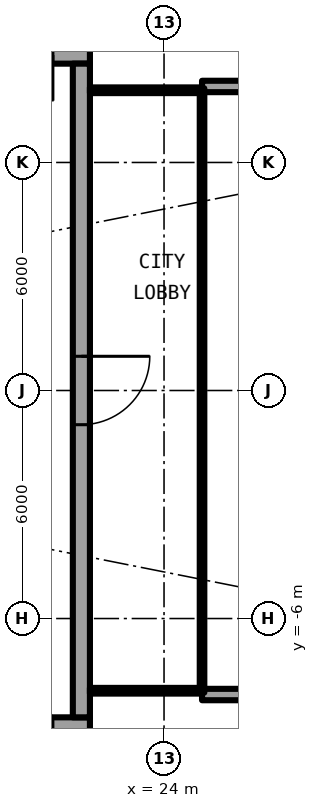
"""IFC4 building model, lengths in metres.
Left out: names, types, materials, properties, quantities, classifications, styles, units other than length and angle.
Written with IfcOpenShell. Run it as: python <this file> out.ifc"""

import sys

from ifc_helpers import new_model, si_unit, direction, frame, frame_2d, origin, place, context, subcontext, project, spatial, rectangle, extrude, element, fill, save


model = new_model("IFC4")
c1 = context("Model", 3, precision=1e-05, world=origin(), true_north=direction((0.0, 1.0)))
c2 = subcontext(c1, "Body", "Model", "MODEL_VIEW")
j1 = project(units=[si_unit("LENGTHUNIT", "METRE"), si_unit("PLANEANGLEUNIT", "RADIAN")], contexts=[c1])
p1 = place(None, origin())
s1 = spatial("IfcSite", under=j1, at=p1, CompositionType="ELEMENT")
p2 = place(p1, origin())
s2 = spatial("IfcBuilding", under=s1, at=p2, CompositionType="ELEMENT")
p3 = place(p2, frame((0.0, 0.0, 196.3)))
s3 = spatial("IfcBuildingStorey", under=s2, at=p3, CompositionType="ELEMENT", Elevation=196.3)
for number, where, z_axis, x_axis in (
    (1, (25.0, 8.0, 0.0), (0.0, 0.0, 1.0), (1.0, 0.0, 0.0)),
    (2, (25.0, -8.0, 0.0), (0.0, 0.0, 1.0), (1.0, 0.0, 0.0)),
):
    element("IfcWall", number, at=place(p3, frame(where, z_axis=z_axis, x_axis=x_axis)), inside=s3, PredefinedType="SOLIDWALL", context=c2, shape_type="SweptSolid", body=[
        extrude(rectangle(XDim=2.667, YDim=0.3, at=frame_2d((1.333, 0.0))), origin(), (0.0, 0.0, 1.0), 2.7),
    ])
p4 = place(p3, frame((22.05, 8.825, 0.0), z_axis=(0.0, 0.0, 1.0), x_axis=(-1.0, 0.0, 0.0)))
e3 = element("IfcWall", 3, at=p4, inside=s3, PredefinedType="SHEAR", context=c2, shape_type="SweptSolid", body=[
    extrude(rectangle(XDim=13.5, YDim=0.45, at=frame_2d((6.75, 0.0))), origin(), (0.0, 0.0, 1.0), 3.05),
])
p5 = place(p4, frame((0.975, 0.0, 0.0)))
e4 = element("IfcOpeningElement", 4, at=p5, cuts=e3, PredefinedType="OPENING", context=c2, shape_type="SweptSolid", body=[
    extrude(rectangle(XDim=1.2, YDim=2.3, at=frame_2d((0.6, 1.15))), frame((0.0, 0.235, 0.0), z_axis=(0.0, -1.0, 0.0), x_axis=(1.0, 0.0, 0.0)), (0.0, 0.0, 1.0), 0.47),
])
p6 = place(p3, frame((8.55, -8.825, 0.0), z_axis=(0.0, 0.0, 1.0), x_axis=(1.0, 0.0, 0.0)))
e5 = element("IfcWall", 5, at=p6, inside=s3, PredefinedType="SHEAR", context=c2, shape_type="SweptSolid", body=[
    extrude(rectangle(XDim=13.5, YDim=0.45, at=frame_2d((6.75, 0.0))), origin(), (0.0, 0.0, 1.0), 3.05),
])
p7 = place(p6, frame((11.325, 0.0, 0.0)))
e6 = element("IfcOpeningElement", 6, at=p7, cuts=e5, PredefinedType="OPENING", context=c2, shape_type="SweptSolid", body=[
    extrude(rectangle(XDim=1.2, YDim=2.3, at=frame_2d((0.6, 1.15))), frame((0.0, 0.235, 0.0), z_axis=(0.0, -1.0, 0.0), x_axis=(1.0, 0.0, 0.0)), (0.0, 0.0, 1.0), 0.47),
])
p8 = place(p3, frame((21.825, 8.6, 0.0), z_axis=(0.0, 0.0, 1.0), x_axis=(0.0, -1.0, 0.0)))
e7 = element("IfcWall", 7, at=p8, inside=s3, PredefinedType="SHEAR", context=c2, shape_type="SweptSolid", body=[
    extrude(rectangle(XDim=17.2, YDim=0.45, at=frame_2d((8.6, 0.0))), origin(), (0.0, 0.0, 1.0), 3.05),
])
p9 = place(p8, frame((7.7, 0.0, 0.0)))
e8 = element("IfcOpeningElement", 8, at=p9, cuts=e7, PredefinedType="OPENING", context=c2, shape_type="SweptSolid", body=[
    extrude(rectangle(XDim=1.8, YDim=2.3, at=frame_2d((0.9, 1.15))), frame((0.0, 0.235, 0.0), z_axis=(0.0, -1.0, 0.0), x_axis=(1.0, 0.0, 0.0)), (0.0, 0.0, 1.0), 0.47),
])
for number, where, z_axis, x_axis in (
    (9, (22.05, -7.9, 0.0), (0.0, 0.0, 1.0), (1.0, 0.0, 0.0)),
    (10, (22.05, 7.9, 0.0), (0.0, 0.0, 1.0), (1.0, 0.0, 0.0)),
):
    element("IfcWall", number, at=place(p3, frame(where, z_axis=z_axis, x_axis=x_axis)), inside=s3, PredefinedType="PARTITIONING", context=c2, shape_type="SweptSolid", body=[
        extrude(rectangle(XDim=2.89, YDim=0.15, at=frame_2d((1.445, 0.0))), origin(), (0.0, 0.0, 1.0), 2.7),
    ])
p10 = place(p3, frame((25.0, -7.95, 0.0), z_axis=(0.0, 0.0, 1.0), x_axis=(0.0, 1.0, 0.0)))
e11 = element("IfcWall", 11, at=p10, inside=s3, PredefinedType="PARTITIONING", context=c2, shape_type="SweptSolid", body=[
    extrude(rectangle(XDim=15.9, YDim=0.12, at=frame_2d((7.95, 0.0))), origin(), (0.0, 0.0, 1.0), 2.7),
])
p11 = place(p10, frame((0.95, 0.0, 0.1)))
e12 = element("IfcOpeningElement", 12, at=p11, cuts=e11, PredefinedType="OPENING", context=c2, shape_type="SweptSolid", body=[
    extrude(rectangle(XDim=14.0, YDim=2.35, at=frame_2d((7.0, 1.175))), frame((0.0, 0.07, 0.0), z_axis=(0.0, -1.0, 0.0), x_axis=(1.0, 0.0, 0.0)), (0.0, 0.0, 1.0), 0.14),
])
p12 = place(p5, origin())
e13 = element("IfcDoor", 13, at=p12, inside=s3, OperationType="SINGLE_SWING_RIGHT", PredefinedType="DOOR", context=c2, shape_type="SweptSolid", body=[
    extrude(rectangle(XDim=1.2, YDim=2.3, at=frame_2d((0.6, 1.15))), frame((0.0, 0.025, 0.0), z_axis=(0.0, -1.0, 0.0), x_axis=(1.0, 0.0, 0.0)), (0.0, 0.0, 1.0), 0.05),
])
fill(e4, e13)
p13 = place(p7, origin())
e14 = element("IfcDoor", 14, at=p13, inside=s3, OperationType="SINGLE_SWING_LEFT", PredefinedType="DOOR", context=c2, shape_type="SweptSolid", body=[
    extrude(rectangle(XDim=1.2, YDim=2.3, at=frame_2d((0.6, 1.15))), frame((0.0, 0.025, 0.0), z_axis=(0.0, -1.0, 0.0), x_axis=(1.0, 0.0, 0.0)), (0.0, 0.0, 1.0), 0.05),
])
fill(e6, e14)
p14 = place(p9, origin())
e15 = element("IfcDoor", 15, at=p14, inside=s3, OperationType="SINGLE_SWING_LEFT", PredefinedType="DOOR", context=c2, shape_type="SweptSolid", body=[
    extrude(rectangle(XDim=1.8, YDim=2.3, at=frame_2d((0.9, 1.15))), frame((0.0, 0.025, 0.0), z_axis=(0.0, -1.0, 0.0), x_axis=(1.0, 0.0, 0.0)), (0.0, 0.0, 1.0), 0.05),
])
fill(e8, e15)
p15 = place(p11, origin())
e16 = element("IfcWindow", 16, at=p15, inside=s3, PartitioningType="SINGLE_PANEL", PredefinedType="WINDOW", context=c2, shape_type="SweptSolid", body=[
    extrude(rectangle(XDim=14.0, YDim=2.35, at=frame_2d((7.0, 1.175))), frame((0.0, 0.03, 0.0), z_axis=(0.0, -1.0, 0.0), x_axis=(1.0, 0.0, 0.0)), (0.0, 0.0, 1.0), 0.06),
])
fill(e12, e16)
save(model, sys.argv[1])
